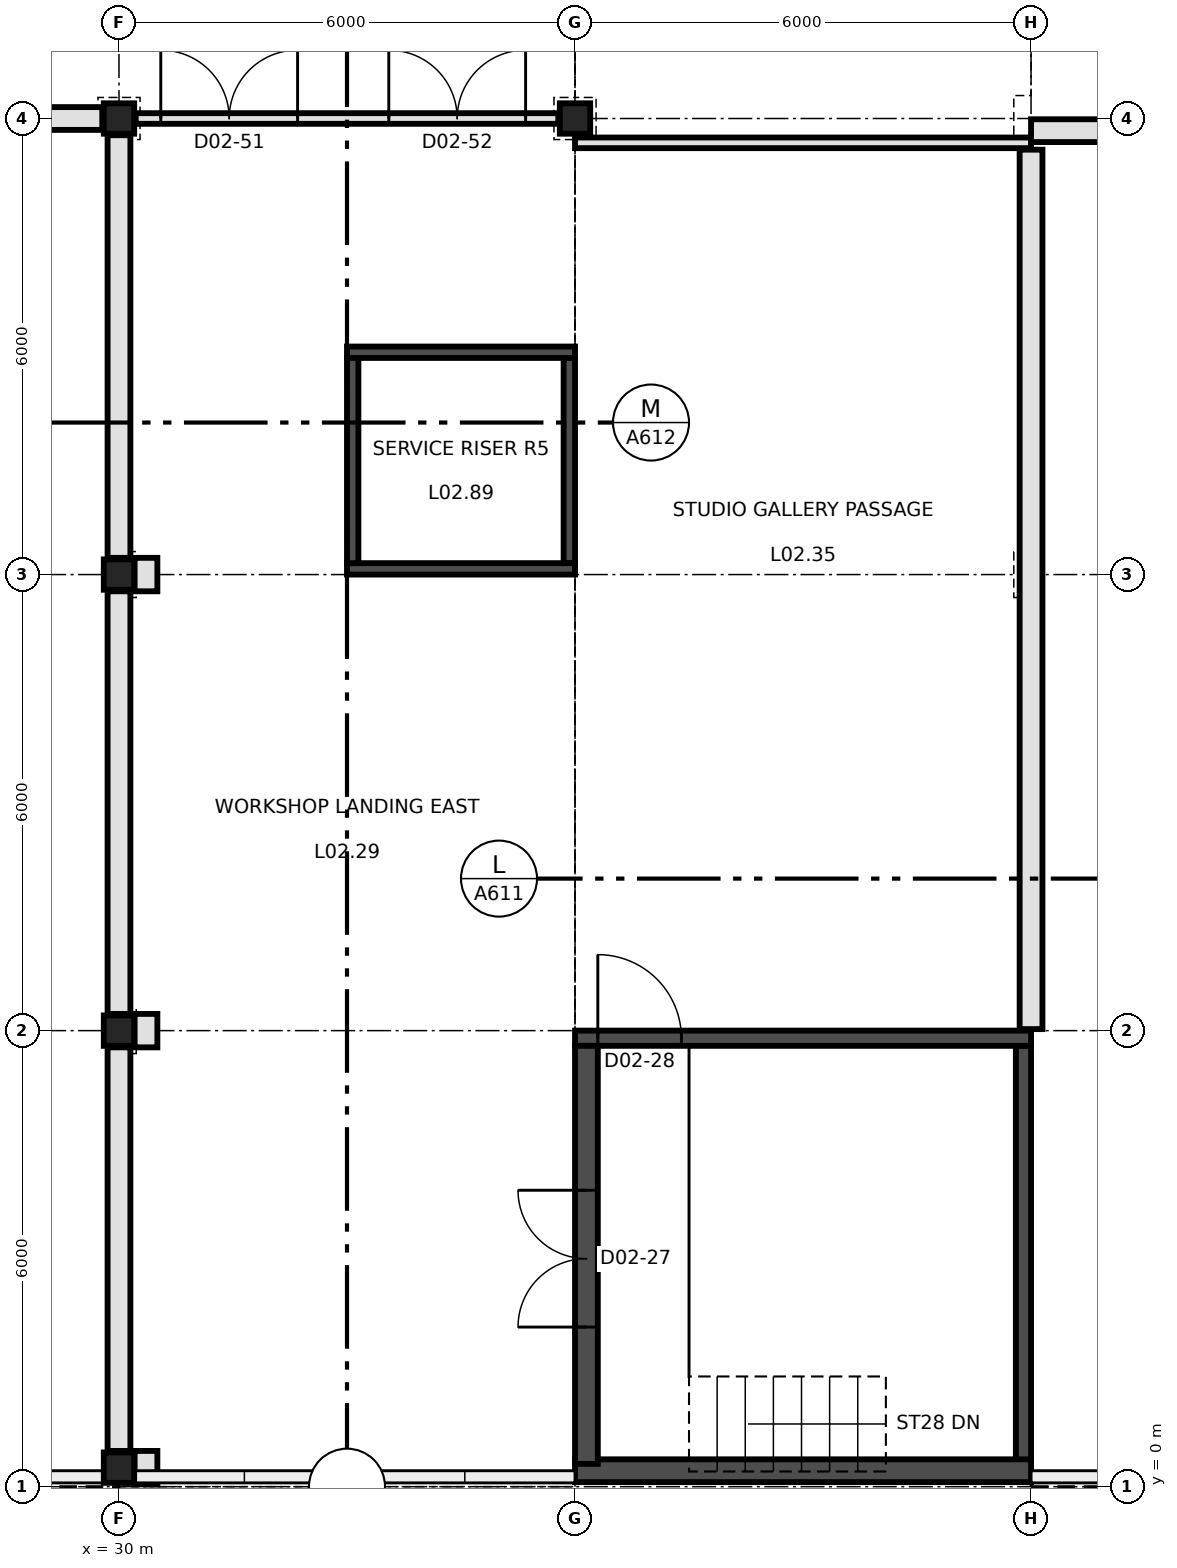
"""IFC4 building model, lengths in metres.
Left out: names, types, materials, properties, quantities, classifications, styles, units other than length and angle.
Written with IfcOpenShell. Run it as: python <this file> out.ifc"""

import sys

from ifc_helpers import new_model, si_unit, direction, frame, frame_2d, origin, origin_2d, place, context, subcontext, project, spatial, rectangle, extrude, element, fill, save


model = new_model("IFC4")
c1 = context("Model", 3, precision=1e-05, world=origin(), true_north=direction((0.0, 1.0)))
c2 = subcontext(c1, "Body", "Model", "MODEL_VIEW")
j1 = project(units=[si_unit("LENGTHUNIT", "METRE"), si_unit("PLANEANGLEUNIT", "RADIAN")], contexts=[c1])
p1 = place(None, origin())
s1 = spatial("IfcSite", under=j1, at=p1, CompositionType="ELEMENT")
p2 = place(p1, origin())
s2 = spatial("IfcBuilding", under=s1, at=p2, CompositionType="ELEMENT")
p3 = place(p2, frame((0.0, 0.0, 12.0)))
s3 = spatial("IfcBuildingStorey", under=s2, at=p3, CompositionType="ELEMENT", Elevation=12.0)
for number, where, z_axis, x_axis in (
    (1, (30.0, 0.25, 0.0), (0.0, 0.0, 1.0), (1.0, 0.0, 0.0)),
    (2, (30.0, 6.0, 0.0), (0.0, 0.0, 1.0), (1.0, 0.0, 0.0)),
    (3, (30.0, 12.0, 0.0), (0.0, 0.0, 1.0), (1.0, 0.0, 0.0)),
    (4, (30.0, 18.0, 0.0), (0.0, 0.0, 1.0), (1.0, 0.0, 0.0)),
    (5, (36.0, 18.0, 0.0), (0.0, 0.0, 1.0), (1.0, 0.0, 0.0)),
):
    element("IfcColumn", number, at=place(p3, frame(where, z_axis=z_axis, x_axis=x_axis)), inside=s3, PredefinedType="COLUMN", context=c2, shape_type="SweptSolid", body=[
        extrude(rectangle(XDim=0.4, YDim=0.4, at=origin_2d()), origin(), (0.0, 0.0, 1.0), 4.5),
    ])
p4 = place(p3, frame((36.0, 5.9, 0.0), z_axis=(0.0, 0.0, 1.0), x_axis=(1.0, 0.0, 0.0)))
e6 = element("IfcWall", 6, at=p4, inside=s3, PredefinedType="SHEAR", context=c2, shape_type="SweptSolid", body=[
    extrude(rectangle(XDim=6.0, YDim=0.2, at=frame_2d((3.0, 0.0))), origin(), (0.0, 0.0, 1.0), 4.5),
])
p5 = place(p4, frame((0.3, 0.0, 0.0)))
e7 = element("IfcOpeningElement", 7, at=p5, cuts=e6, PredefinedType="OPENING", context=c2, shape_type="SweptSolid", body=[
    extrude(rectangle(XDim=1.1, YDim=2.2, at=frame_2d((0.55, 1.1))), frame((0.0, 0.11, 0.0), z_axis=(0.0, -1.0, 0.0), x_axis=(1.0, 0.0, 0.0)), (0.0, 0.0, 1.0), 0.22),
])
p6 = place(p3, frame((36.0, 0.21, 0.0), z_axis=(0.0, 0.0, 1.0), x_axis=(1.0, 0.0, 0.0)))
e8 = element("IfcWall", 8, at=p6, inside=s3, PredefinedType="SHEAR", context=c2, shape_type="SweptSolid", body=[
    extrude(rectangle(XDim=6.0, YDim=0.3, at=frame_2d((3.0, 0.0))), origin(), (0.0, 0.0, 1.0), 4.5),
])
p7 = place(p3, frame((36.15, 0.3, 0.0), z_axis=(0.0, 0.0, 1.0), x_axis=(0.0, 1.0, 0.0)))
e9 = element("IfcWall", 9, at=p7, inside=s3, PredefinedType="SHEAR", context=c2, shape_type="SweptSolid", body=[
    extrude(rectangle(XDim=5.5, YDim=0.3, at=frame_2d((2.75, 0.0))), origin(), (0.0, 0.0, 1.0), 4.5),
])
p8 = place(p7, frame((1.8, 0.0, 0.0)))
e10 = element("IfcOpeningElement", 10, at=p8, cuts=e9, PredefinedType="OPENING", context=c2, shape_type="SweptSolid", body=[
    extrude(rectangle(XDim=1.8, YDim=2.2, at=frame_2d((0.9, 1.1))), frame((0.0, 0.16, 0.0), z_axis=(0.0, -1.0, 0.0), x_axis=(1.0, 0.0, 0.0)), (0.0, 0.0, 1.0), 0.32),
])
p9 = place(p3, frame((41.9, 0.3, 0.0), z_axis=(0.0, 0.0, 1.0), x_axis=(0.0, 1.0, 0.0)))
e11 = element("IfcWall", 11, at=p9, inside=s3, PredefinedType="SHEAR", context=c2, shape_type="SweptSolid", body=[
    extrude(rectangle(XDim=5.5, YDim=0.2, at=frame_2d((2.75, 0.0))), origin(), (0.0, 0.0, 1.0), 4.5),
])
for number, where, z_axis, x_axis in (
    (12, (33.0, 14.925, 0.0), (0.0, 0.0, 1.0), (1.0, 0.0, 0.0)),
    (13, (33.0, 12.075, 0.0), (0.0, 0.0, 1.0), (1.0, 0.0, 0.0)),
):
    element("IfcWall", number, at=place(p3, frame(where, z_axis=z_axis, x_axis=x_axis)), inside=s3, PredefinedType="SHEAR", context=c2, shape_type="SweptSolid", body=[
        extrude(rectangle(XDim=3.0, YDim=0.15, at=frame_2d((1.5, 0.0))), origin(), (0.0, 0.0, 1.0), 4.5),
    ])
for number, where, z_axis, x_axis in (
    (14, (33.075, 12.15, 0.0), (0.0, 0.0, 1.0), (0.0, 1.0, 0.0)),
    (15, (35.925, 12.15, 0.0), (0.0, 0.0, 1.0), (0.0, 1.0, 0.0)),
):
    element("IfcWall", number, at=place(p3, frame(where, z_axis=z_axis, x_axis=x_axis)), inside=s3, PredefinedType="SHEAR", context=c2, shape_type="SweptSolid", body=[
        extrude(rectangle(XDim=2.7, YDim=0.15, at=frame_2d((1.35, 0.0))), origin(), (0.0, 0.0, 1.0), 4.5),
    ])
p10 = place(p2, frame((0.0, 0.0, 7.0)))
s4 = spatial("IfcBuildingStorey", under=s2, at=p10, CompositionType="ELEMENT", Elevation=7.0)
p11 = place(p10, frame((47.8, 0.375, 0.0), z_axis=(0.0, 0.0, 1.0), x_axis=(-1.0, 0.0, 0.0)))
e16 = element("IfcWall", 16, at=p11, inside=s4, PredefinedType="SOLIDWALL", context=c2, shape_type="SweptSolid", body=[
    extrude(rectangle(XDim=5.8, YDim=0.25, at=frame_2d((2.9, 0.0))), origin(), (0.0, 0.0, 1.0), 9.5),
])
p12 = place(p10, frame((29.8, 0.375, 0.0), z_axis=(0.0, 0.0, 1.0), x_axis=(-1.0, 0.0, 0.0)))
e17 = element("IfcWall", 17, at=p12, inside=s4, PredefinedType="SOLIDWALL", context=c2, shape_type="SweptSolid", body=[
    extrude(rectangle(XDim=5.6, YDim=0.25, at=frame_2d((2.8, 0.0))), origin(), (0.0, 0.0, 1.0), 8.9),
])
p13 = place(p3, frame((30.22, 18.0, 0.0), z_axis=(0.0, 0.0, 1.0), x_axis=(1.0, 0.0, 0.0)))
e18 = element("IfcWall", 18, at=p13, inside=s3, PredefinedType="PARTITIONING", context=c2, shape_type="SweptSolid", body=[
    extrude(rectangle(XDim=5.56, YDim=0.14, at=frame_2d((2.78, 0.0))), origin(), (0.0, 0.0, 1.0), 3.9),
])
p14 = place(p13, frame((0.33, 0.0, 0.0)))
e19 = element("IfcOpeningElement", 19, at=p14, cuts=e18, PredefinedType="OPENING", context=c2, shape_type="SweptSolid", body=[
    extrude(rectangle(XDim=1.8, YDim=2.1, at=frame_2d((0.9, 1.05))), frame((0.0, 0.08, 0.0), z_axis=(0.0, -1.0, 0.0), x_axis=(1.0, 0.0, 0.0)), (0.0, 0.0, 1.0), 0.16),
])
p15 = place(p13, frame((3.33, 0.0, 0.0)))
e20 = element("IfcOpeningElement", 20, at=p15, cuts=e18, PredefinedType="OPENING", context=c2, shape_type="SweptSolid", body=[
    extrude(rectangle(XDim=1.8, YDim=2.1, at=frame_2d((0.9, 1.05))), frame((0.0, 0.08, 0.0), z_axis=(0.0, -1.0, 0.0), x_axis=(1.0, 0.0, 0.0)), (0.0, 0.0, 1.0), 0.16),
])
p16 = place(p3, frame((36.0, 17.68, 0.0), z_axis=(0.0, 0.0, 1.0), x_axis=(1.0, 0.0, 0.0)))
e21 = element("IfcWall", 21, at=p16, inside=s3, PredefinedType="PARTITIONING", context=c2, shape_type="SweptSolid", body=[
    extrude(rectangle(XDim=6.0, YDim=0.14, at=frame_2d((3.0, 0.0))), origin(), (0.0, 0.0, 1.0), 4.28),
])
p17 = place(p3, frame((24.22, 18.0, 0.0), z_axis=(0.0, 0.0, 1.0), x_axis=(1.0, 0.0, 0.0)))
e22 = element("IfcWall", 22, at=p17, inside=s3, PredefinedType="PARTITIONING", context=c2, shape_type="SweptSolid", body=[
    extrude(rectangle(XDim=5.56, YDim=0.3, at=frame_2d((2.78, 0.0))), origin(), (0.0, 0.0, 1.0), 3.9),
])
p18 = place(p3, frame((42.0, 17.84, 0.0), z_axis=(0.0, 0.0, 1.0), x_axis=(1.0, 0.0, 0.0)))
e23 = element("IfcWall", 23, at=p18, inside=s3, PredefinedType="PARTITIONING", context=c2, shape_type="SweptSolid", body=[
    extrude(rectangle(XDim=12.2, YDim=0.3, at=frame_2d((6.1, 0.0))), origin(), (0.0, 0.0, 1.0), 4.28),
])
p19 = place(p3, frame((30.0, 0.47, 0.0), z_axis=(0.0, 0.0, 1.0), x_axis=(0.0, 1.0, 0.0)))
e24 = element("IfcWall", 24, at=p19, inside=s3, PredefinedType="PARTITIONING", context=c2, shape_type="SweptSolid", body=[
    extrude(rectangle(XDim=5.31, YDim=0.3, at=frame_2d((2.655, 0.0))), origin(), (0.0, 0.0, 1.0), 3.9),
])
for number, where, z_axis, x_axis in (
    (25, (30.0, 6.22, 0.0), (0.0, 0.0, 1.0), (0.0, 1.0, 0.0)),
    (26, (30.0, 12.22, 0.0), (0.0, 0.0, 1.0), (0.0, 1.0, 0.0)),
):
    element("IfcWall", number, at=place(p3, frame(where, z_axis=z_axis, x_axis=x_axis)), inside=s3, PredefinedType="PARTITIONING", context=c2, shape_type="SweptSolid", body=[
        extrude(rectangle(XDim=5.56, YDim=0.3, at=frame_2d((2.78, 0.0))), origin(), (0.0, 0.0, 1.0), 3.9),
    ])
for number, where, z_axis, x_axis in (
    (27, (30.355, 0.031, 0.0), (0.0, 0.0, 1.0), (0.0, 1.0, 0.0)),
    (28, (30.355, 5.78, 0.0), (0.0, 0.0, 1.0), (0.0, 1.0, 0.0)),
    (29, (30.355, 11.78, 0.0), (0.0, 0.0, 1.0), (0.0, 1.0, 0.0)),
):
    element("IfcWall", number, at=place(p3, frame(where, z_axis=z_axis, x_axis=x_axis)), inside=s3, PredefinedType="PARTITIONING", context=c2, shape_type="SweptSolid", body=[
        extrude(rectangle(XDim=0.44, YDim=0.3, at=frame_2d((0.22, 0.0))), origin(), (0.0, 0.0, 1.0), 4.28),
    ])
p20 = place(p3, frame((42.0, 6.02, 0.0), z_axis=(0.0, 0.0, 1.0), x_axis=(0.0, 1.0, 0.0)))
e30 = element("IfcWall", 30, at=p20, inside=s3, PredefinedType="PARTITIONING", context=c2, shape_type="SweptSolid", body=[
    extrude(rectangle(XDim=11.57, YDim=0.3, at=frame_2d((5.785, 0.0))), origin(), (0.0, 0.0, 1.0), 4.28),
])
p21 = place(p8, frame((1.8, 0.0, 0.0), z_axis=(0.0, 0.0, 1.0), x_axis=(-1.0, 0.0, 0.0)))
e31 = element("IfcDoor", 31, at=p21, inside=s3, OperationType="DOUBLE_DOOR_SINGLE_SWING", PredefinedType="DOOR", context=c2, shape_type="SweptSolid", body=[
    extrude(rectangle(XDim=1.8, YDim=2.2, at=frame_2d((0.9, 1.1))), frame((0.0, 0.025, 0.0), z_axis=(0.0, -1.0, 0.0), x_axis=(1.0, 0.0, 0.0)), (0.0, 0.0, 1.0), 0.05),
])
fill(e10, e31)
p22 = place(p5, frame((1.1, 0.0, 0.0), z_axis=(0.0, 0.0, 1.0), x_axis=(-1.0, 0.0, 0.0)))
e32 = element("IfcDoor", 32, at=p22, inside=s3, OperationType="SINGLE_SWING_LEFT", PredefinedType="DOOR", context=c2, shape_type="SweptSolid", body=[
    extrude(rectangle(XDim=1.1, YDim=2.2, at=frame_2d((0.55, 1.1))), frame((0.0, 0.025, 0.0), z_axis=(0.0, -1.0, 0.0), x_axis=(1.0, 0.0, 0.0)), (0.0, 0.0, 1.0), 0.05),
])
fill(e7, e32)
p23 = place(p14, origin())
e33 = element("IfcDoor", 33, at=p23, inside=s3, OperationType="DOUBLE_DOOR_SINGLE_SWING", PredefinedType="DOOR", context=c2, shape_type="SweptSolid", body=[
    extrude(rectangle(XDim=1.8, YDim=2.1, at=frame_2d((0.9, 1.05))), frame((0.0, 0.025, 0.0), z_axis=(0.0, -1.0, 0.0), x_axis=(1.0, 0.0, 0.0)), (0.0, 0.0, 1.0), 0.05),
])
fill(e19, e33)
p24 = place(p15, origin())
e34 = element("IfcDoor", 34, at=p24, inside=s3, OperationType="DOUBLE_DOOR_SINGLE_SWING", PredefinedType="DOOR", context=c2, shape_type="SweptSolid", body=[
    extrude(rectangle(XDim=1.8, YDim=2.1, at=frame_2d((0.9, 1.05))), frame((0.0, 0.025, 0.0), z_axis=(0.0, -1.0, 0.0), x_axis=(1.0, 0.0, 0.0)), (0.0, 0.0, 1.0), 0.05),
])
fill(e20, e34)
save(model, sys.argv[1])
